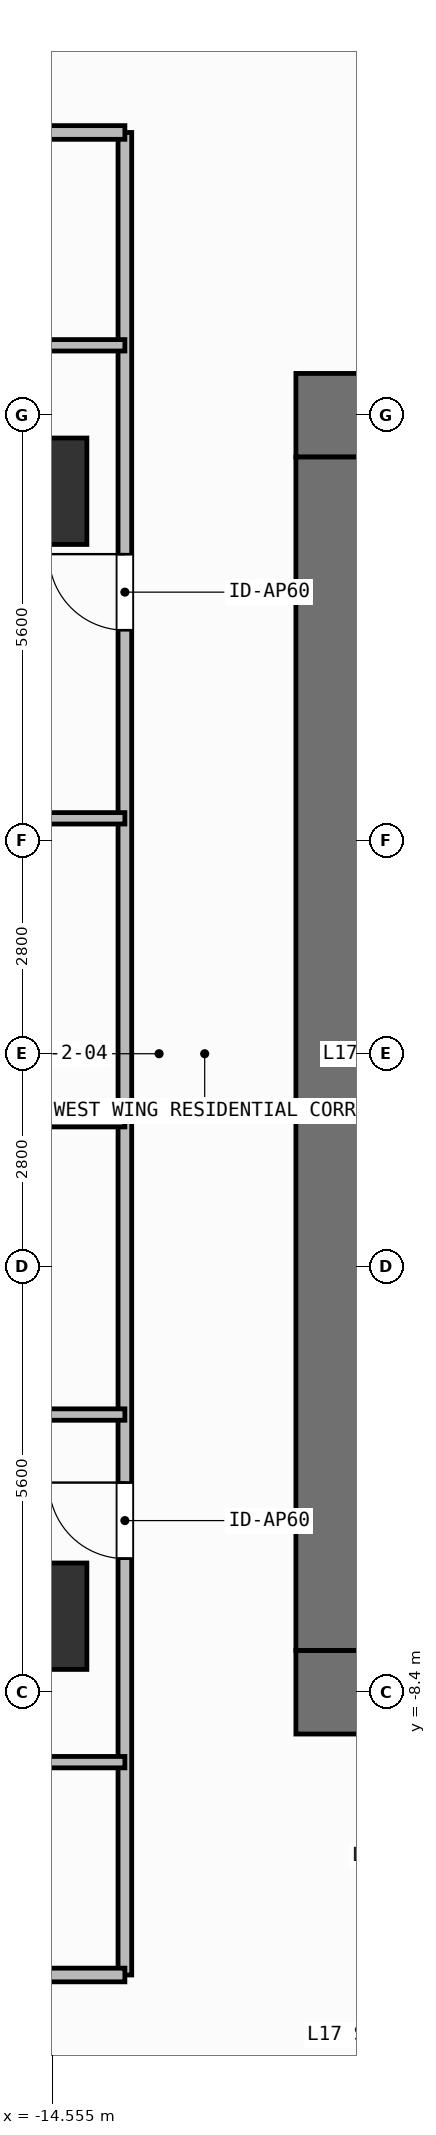
"""IFC4 building model, lengths in metres.
Left out: names, types, materials, properties, quantities, classifications, styles, units other than length and angle.
Written with IfcOpenShell. Run it as: python <this file> out.ifc"""

import sys

from ifc_helpers import new_model, si_unit, direction, frame, frame_2d, origin, origin_2d, place, context, subcontext, project, spatial, rectangle, extrude, element, fill, save


model = new_model("IFC4")
c1 = context("Model", 3, precision=1e-05, world=origin(), true_north=direction((0.0, 1.0)))
c2 = subcontext(c1, "Body", "Model", "MODEL_VIEW")
j1 = project(units=[si_unit("LENGTHUNIT", "METRE"), si_unit("PLANEANGLEUNIT", "RADIAN")], contexts=[c1])
p1 = place(None, origin())
s1 = spatial("IfcSite", under=j1, at=p1, CompositionType="ELEMENT")
p2 = place(p1, origin())
s2 = spatial("IfcBuilding", under=s1, at=p2, CompositionType="ELEMENT")
p3 = place(p2, frame((0.0, 0.0, 65.7)))
s3 = spatial("IfcBuildingStorey", under=s2, at=p3, CompositionType="ELEMENT", Elevation=65.7)
for number, where, z_axis, x_axis in (
    (1, (-11.35, -8.4, 0.0), (0.0, 0.0, 1.0), (1.0, 0.0, 0.0)),
    (2, (-11.35, 8.4, 0.0), (0.0, 0.0, 1.0), (1.0, 0.0, 0.0)),
):
    element("IfcWall", number, at=place(p3, frame(where, z_axis=z_axis, x_axis=x_axis)), inside=s3, PredefinedType="SHEAR", context=c2, shape_type="SweptSolid", body=[
        extrude(rectangle(XDim=1.65, YDim=1.1, at=frame_2d((0.825, 0.0))), origin(), (0.0, 0.0, 1.0), 3.9),
    ])
p4 = place(p3, frame((-10.8, -7.85, 0.0), z_axis=(0.0, 0.0, 1.0), x_axis=(0.0, 1.0, 0.0)))
e3 = element("IfcWall", 3, at=p4, inside=s3, PredefinedType="SHEAR", context=c2, shape_type="SweptSolid", body=[
    extrude(rectangle(XDim=15.7, YDim=1.1, at=frame_2d((7.85, 0.0))), origin(), (0.0, 0.0, 1.0), 3.9),
])
for number, where, z_axis, x_axis in (
    (4, (-14.8, -7.4, 0.0), (0.0, 0.0, 1.0), (1.0, 0.0, 0.0)),
    (5, (-14.8, 7.4, 0.0), (0.0, 0.0, 1.0), (1.0, 0.0, 0.0)),
):
    element("IfcColumn", number, at=place(p3, frame(where, z_axis=z_axis, x_axis=x_axis)), inside=s3, PredefinedType="COLUMN", context=c2, shape_type="SweptSolid", body=[
        extrude(rectangle(XDim=1.4, YDim=1.4, at=origin_2d()), origin(), (0.0, 0.0, 1.0), 3.9),
    ])
p5 = place(p3, frame((-13.6, -12.12, 0.0), z_axis=(0.0, 0.0, 1.0), x_axis=(0.0, 1.0, 0.0)))
e6 = element("IfcWall", 6, at=p5, inside=s3, PredefinedType="PARTITIONING", context=c2, shape_type="SweptSolid", body=[
    extrude(rectangle(XDim=11.247, YDim=0.18, at=frame_2d((5.624, 0.0))), origin(), (0.0, 0.0, 1.0), 3.68),
])
p6 = place(p5, frame((5.478, 0.0, 0.0)))
e7 = element("IfcOpeningElement", 7, at=p6, cuts=e6, PredefinedType="OPENING", context=c2, shape_type="SweptSolid", body=[
    extrude(rectangle(XDim=1.0, YDim=2.2, at=frame_2d((0.5, 1.1))), frame((0.0, 0.1, 0.0), z_axis=(0.0, -1.0, 0.0), x_axis=(1.0, 0.0, 0.0)), (0.0, 0.0, 1.0), 0.2),
])
p7 = place(p3, frame((-19.553, -4.747, 0.0), z_axis=(0.0, 0.0, 1.0), x_axis=(1.0, 0.0, 0.0)))
e8 = element("IfcWall", 8, at=p7, inside=s3, PredefinedType="PARTITIONING", context=c2, shape_type="SweptSolid", body=[
    extrude(rectangle(XDim=5.953, YDim=0.15, at=frame_2d((2.977, 0.0))), origin(), (0.0, 0.0, 1.0), 3.68),
])
p8 = place(p7, frame((2.64, 0.0, 0.0)))
e9 = element("IfcOpeningElement", 9, at=p8, cuts=e8, PredefinedType="OPENING", context=c2, shape_type="SweptSolid", body=[
    extrude(rectangle(XDim=0.85, YDim=2.1, at=frame_2d((0.425, 1.05))), frame((0.0, 0.085, 0.0), z_axis=(0.0, -1.0, 0.0), x_axis=(1.0, 0.0, 0.0)), (0.0, 0.0, 1.0), 0.17),
])
p9 = place(p3, frame((-23.69, -9.32, 0.0), z_axis=(0.0, 0.0, 1.0), x_axis=(1.0, 0.0, 0.0)))
e10 = element("IfcWall", 10, at=p9, inside=s3, PredefinedType="PARTITIONING", context=c2, shape_type="SweptSolid", body=[
    extrude(rectangle(XDim=10.09, YDim=0.15, at=frame_2d((5.045, 0.0))), origin(), (0.0, 0.0, 1.0), 3.68),
])
p10 = place(p9, frame((5.512, 0.0, 0.0)))
e11 = element("IfcOpeningElement", 11, at=p10, cuts=e10, PredefinedType="OPENING", context=c2, shape_type="SweptSolid", body=[
    extrude(rectangle(XDim=0.85, YDim=2.1, at=frame_2d((0.425, 1.05))), frame((0.0, 0.085, 0.0), z_axis=(0.0, -1.0, 0.0), x_axis=(1.0, 0.0, 0.0)), (0.0, 0.0, 1.0), 0.17),
])
p11 = place(p3, frame((-13.6, -0.873, 0.0), z_axis=(0.0, 0.0, 1.0), x_axis=(0.0, 1.0, 0.0)))
e12 = element("IfcWall", 12, at=p11, inside=s3, PredefinedType="PARTITIONING", context=c2, shape_type="SweptSolid", body=[
    extrude(rectangle(XDim=12.993, YDim=0.18, at=frame_2d((6.497, 0.0))), origin(), (0.0, 0.0, 1.0), 3.68),
])
p12 = place(p11, frame((6.446, 0.0, 0.0)))
e13 = element("IfcOpeningElement", 13, at=p12, cuts=e12, PredefinedType="OPENING", context=c2, shape_type="SweptSolid", body=[
    extrude(rectangle(XDim=1.0, YDim=2.2, at=frame_2d((0.5, 1.1))), frame((0.0, 0.1, 0.0), z_axis=(0.0, -1.0, 0.0), x_axis=(1.0, 0.0, 0.0)), (0.0, 0.0, 1.0), 0.2),
])
p13 = place(p3, frame((-19.553, 9.32, 0.0), z_axis=(0.0, 0.0, 1.0), x_axis=(1.0, 0.0, 0.0)))
e14 = element("IfcWall", 14, at=p13, inside=s3, PredefinedType="PARTITIONING", context=c2, shape_type="SweptSolid", body=[
    extrude(rectangle(XDim=5.953, YDim=0.15, at=frame_2d((2.977, 0.0))), origin(), (0.0, 0.0, 1.0), 3.68),
])
p14 = place(p13, frame((2.64, 0.0, 0.0)))
e15 = element("IfcOpeningElement", 15, at=p14, cuts=e14, PredefinedType="OPENING", context=c2, shape_type="SweptSolid", body=[
    extrude(rectangle(XDim=0.85, YDim=2.1, at=frame_2d((0.425, 1.05))), frame((0.0, 0.085, 0.0), z_axis=(0.0, -1.0, 0.0), x_axis=(1.0, 0.0, 0.0)), (0.0, 0.0, 1.0), 0.17),
])
p15 = place(p3, frame((-23.69, 3.097, 0.0), z_axis=(0.0, 0.0, 1.0), x_axis=(1.0, 0.0, 0.0)))
e16 = element("IfcWall", 16, at=p15, inside=s3, PredefinedType="PARTITIONING", context=c2, shape_type="SweptSolid", body=[
    extrude(rectangle(XDim=10.09, YDim=0.15, at=frame_2d((5.045, 0.0))), origin(), (0.0, 0.0, 1.0), 3.68),
])
p16 = place(p15, frame((4.62, 0.0, 0.0)))
e17 = element("IfcOpeningElement", 17, at=p16, cuts=e16, PredefinedType="OPENING", context=c2, shape_type="SweptSolid", body=[
    extrude(rectangle(XDim=0.85, YDim=2.1, at=frame_2d((0.425, 1.05))), frame((0.0, 0.085, 0.0), z_axis=(0.0, -1.0, 0.0), x_axis=(1.0, 0.0, 0.0)), (0.0, 0.0, 1.0), 0.17),
])
for number, where, z_axis, x_axis in (
    (18, (-27.93, -0.873, 0.0), (0.0, 0.0, 1.0), (1.0, 0.0, 0.0)),
    (19, (-27.93, -12.12, 0.0), (0.0, 0.0, 1.0), (1.0, 0.0, 0.0)),
    (20, (-27.93, 12.12, 0.0), (0.0, 0.0, 1.0), (1.0, 0.0, 0.0)),
):
    element("IfcWall", number, at=place(p3, frame(where, z_axis=z_axis, x_axis=x_axis)), inside=s3, PredefinedType="PARTITIONING", context=c2, shape_type="SweptSolid", body=[
        extrude(rectangle(XDim=14.33, YDim=0.18, at=frame_2d((7.165, 0.0))), origin(), (0.0, 0.0, 1.0), 3.68),
    ])
p17 = place(p6, origin())
e21 = element("IfcDoor", 21, at=p17, inside=s3, OperationType="SINGLE_SWING_RIGHT", PredefinedType="DOOR", context=c2, shape_type="SweptSolid", body=[
    extrude(rectangle(XDim=1.0, YDim=2.2, at=frame_2d((0.5, 1.1))), frame((0.0, 0.025, 0.0), z_axis=(0.0, -1.0, 0.0), x_axis=(1.0, 0.0, 0.0)), (0.0, 0.0, 1.0), 0.05),
])
fill(e7, e21)
p18 = place(p12, origin())
e22 = element("IfcDoor", 22, at=p18, inside=s3, OperationType="SINGLE_SWING_RIGHT", PredefinedType="DOOR", context=c2, shape_type="SweptSolid", body=[
    extrude(rectangle(XDim=1.0, YDim=2.2, at=frame_2d((0.5, 1.1))), frame((0.0, 0.025, 0.0), z_axis=(0.0, -1.0, 0.0), x_axis=(1.0, 0.0, 0.0)), (0.0, 0.0, 1.0), 0.05),
])
fill(e13, e22)
save(model, sys.argv[1])
